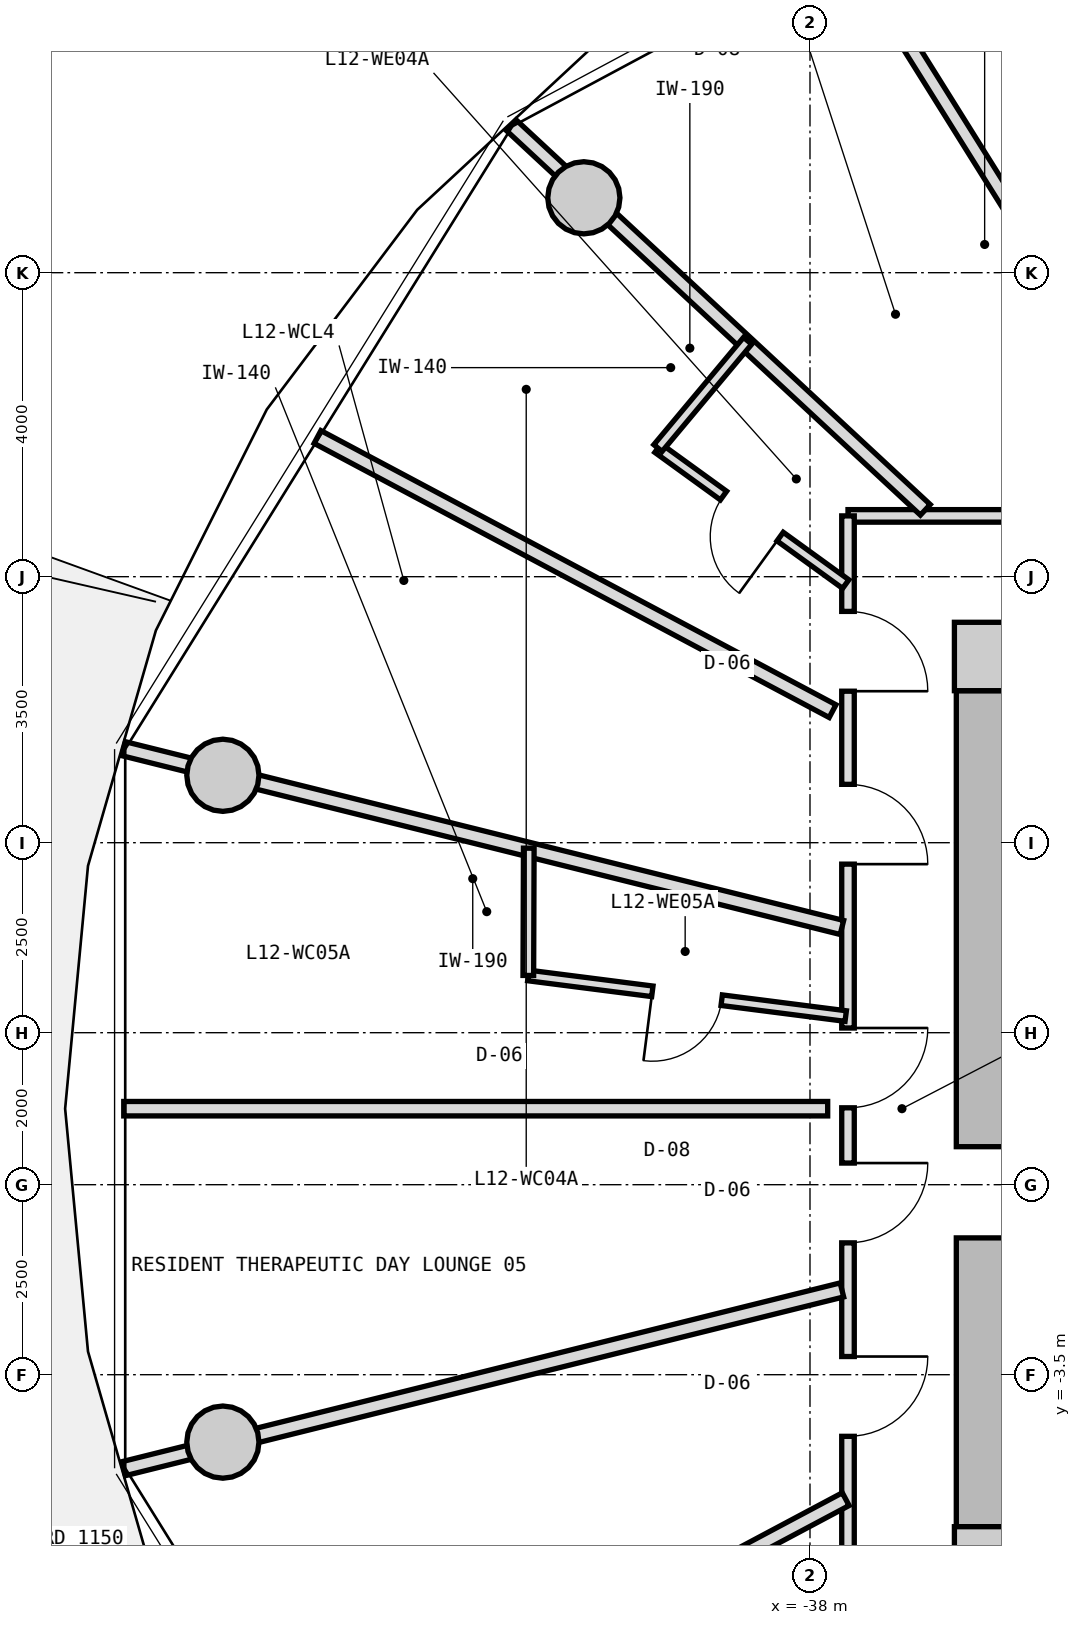
"""IFC4 building model, lengths in metres.
Left out: names, types, materials, properties, quantities, classifications, styles, units other than length and angle.
Written with IfcOpenShell. Run it as: python <this file> out.ifc"""

import sys

from ifc_helpers import new_model, si_unit, direction, frame, frame_2d, origin, origin_2d, place, context, subcontext, project, spatial, rectangle, circle, extrude, source, transform, mapped, element, fill, save


model = new_model("IFC4")
c1 = context("Model", 3, precision=1e-05, world=origin(), true_north=direction((0.0, 1.0)))
c2 = subcontext(c1, "Body", "Model", "MODEL_VIEW")
j1 = project(units=[si_unit("LENGTHUNIT", "METRE"), si_unit("PLANEANGLEUNIT", "RADIAN")], contexts=[c1])
p1 = place(None, origin())
s1 = spatial("IfcSite", under=j1, at=p1, CompositionType="ELEMENT")
p2 = place(p1, origin())
s2 = spatial("IfcBuilding", under=s1, at=p2, CompositionType="ELEMENT")
p3 = place(p2, frame((0.0, 0.0, 42.95)))
s3 = spatial("IfcBuildingStorey", under=s2, at=p3, CompositionType="ELEMENT", Elevation=42.95)
m1 = source(origin(), c2, "Body", "SweptSolid", [
    extrude(rectangle(XDim=0.9, YDim=0.9, at=origin_2d()), origin(), (0.0, 0.0, 1.0), 3.05),
])
for number, where, z_axis, x_axis in (
    (1, (-35.65, -5.95, 0.0), (0.0, 0.0, 1.0), (1.0, 0.0, 0.0)),
    (2, (-35.65, 5.95, 0.0), (0.0, 0.0, 1.0), (1.0, 0.0, 0.0)),
):
    element("IfcColumn", number, at=place(p3, frame(where, z_axis=z_axis, x_axis=x_axis)), inside=s3, PredefinedType="COLUMN", context=c2, shape_type="MappedRepresentation", body=[
        mapped(m1, transform((0.0, 0.0, 0.0), x_axis=(1.0, 0.0, 0.0), y_axis=(0.0, 1.0, 0.0), z_axis=(0.0, 0.0, 1.0), scale=1.0)),
    ])
m2 = source(origin(), c2, "Body", "SweptSolid", [
    extrude(rectangle(XDim=11.0, YDim=0.85, at=frame_2d((5.5, 0.0))), origin(), (0.0, 0.0, 1.0), 2.79),
])
p4 = place(p3, frame((-35.65, -5.5, 0.0), z_axis=(0.0, 0.0, 1.0), x_axis=(0.0, 1.0, 0.0)))
e3 = element("IfcWall", 3, at=p4, inside=s3, PredefinedType="SHEAR", context=c2, shape_type="MappedRepresentation", body=[
    mapped(m2, transform((0.0, 0.0, 0.0), x_axis=(1.0, 0.0, 0.0), y_axis=(0.0, 1.0, 0.0), z_axis=(0.0, 0.0, 1.0), scale=1.0)),
])
p5 = place(p4, frame((3.8, 0.0, 0.0)))
e4 = element("IfcOpeningElement", 4, at=p5, cuts=e3, PredefinedType="OPENING", context=c2, shape_type="SweptSolid", body=[
    extrude(rectangle(XDim=1.2, YDim=2.15, at=frame_2d((0.6, 1.075))), frame((0.0, 0.435, 0.0), z_axis=(0.0, -1.0, 0.0), x_axis=(1.0, 0.0, 0.0)), (0.0, 0.0, 1.0), 0.87),
])
m3 = source(origin(), c2, "Body", "SweptSolid", [
    extrude(circle(Radius=0.475, at=origin_2d()), origin(), (0.0, 0.0, 1.0), 3.05),
])
for number, where, z_axis, x_axis in (
    (5, (-40.975, 11.985, 0.0), (0.0, 0.0, 1.0), (1.0, 0.0, 0.0)),
    (6, (-45.725, 4.387, 0.0), (0.0, 0.0, 1.0), (1.0, 0.0, 0.0)),
    (7, (-45.725, -4.387, 0.0), (0.0, 0.0, 1.0), (1.0, 0.0, 0.0)),
):
    element("IfcColumn", number, at=place(p3, frame(where, z_axis=z_axis, x_axis=x_axis)), inside=s3, PredefinedType="COLUMN", context=c2, shape_type="MappedRepresentation", body=[
        mapped(m3, transform((0.0, 0.0, 0.0), x_axis=(1.0, 0.0, 0.0), y_axis=(0.0, 1.0, 0.0), z_axis=(0.0, 0.0, 1.0), scale=1.0)),
    ])
m4 = source(origin(), c2, "Body", "SweptSolid", [
    extrude(rectangle(XDim=19.0, YDim=0.165, at=frame_2d((9.5, 0.0))), origin(), (0.0, 0.0, 1.0), 2.775),
])
p6 = place(p3, frame((-37.5, 7.8, 0.0), z_axis=(0.0, 0.0, 1.0), x_axis=(1.0, 0.0, 0.0)))
e8 = element("IfcWall", 8, at=p6, inside=s3, PredefinedType="PARTITIONING", context=c2, shape_type="MappedRepresentation", body=[
    mapped(m4, transform((0.0, 0.0, 0.0), x_axis=(1.0, 0.0, 0.0), y_axis=(0.0, 1.0, 0.0), z_axis=(0.0, 0.0, 1.0), scale=1.0)),
])
p7 = place(p6, frame((4.773, 0.0, 0.0)))
e9 = element("IfcOpeningElement", 9, at=p7, cuts=e8, PredefinedType="OPENING", context=c2, shape_type="SweptSolid", body=[
    extrude(rectangle(XDim=1.05, YDim=2.15, at=frame_2d((0.525, 1.075))), frame((0.0, 0.093, 0.0), z_axis=(0.0, -1.0, 0.0), x_axis=(1.0, 0.0, 0.0)), (0.0, 0.0, 1.0), 0.185),
])
p8 = place(p6, frame((2.251, 0.0, 0.0)))
e10 = element("IfcOpeningElement", 10, at=p8, cuts=e8, PredefinedType="OPENING", context=c2, shape_type="SweptSolid", body=[
    extrude(rectangle(XDim=1.05, YDim=2.15, at=frame_2d((0.525, 1.075))), frame((0.0, 0.093, 0.0), z_axis=(0.0, -1.0, 0.0), x_axis=(1.0, 0.0, 0.0)), (0.0, 0.0, 1.0), 0.185),
])
p9 = place(p6, frame((14.653, 0.0, 0.0)))
e11 = element("IfcOpeningElement", 11, at=p9, cuts=e8, PredefinedType="OPENING", context=c2, shape_type="SweptSolid", body=[
    extrude(rectangle(XDim=1.05, YDim=2.15, at=frame_2d((0.525, 1.075))), frame((0.0, 0.093, 0.0), z_axis=(0.0, -1.0, 0.0), x_axis=(1.0, 0.0, 0.0)), (0.0, 0.0, 1.0), 0.185),
])
p10 = place(p6, frame((12.5, 0.0, 0.0)))
e12 = element("IfcOpeningElement", 12, at=p10, cuts=e8, PredefinedType="OPENING", context=c2, shape_type="SweptSolid", body=[
    extrude(rectangle(XDim=1.05, YDim=2.15, at=frame_2d((0.525, 1.075))), frame((0.0, 0.093, 0.0), z_axis=(0.0, -1.0, 0.0), x_axis=(1.0, 0.0, 0.0)), (0.0, 0.0, 1.0), 0.185),
])
p11 = place(p6, frame((9.352, 0.0, 0.0)))
e13 = element("IfcOpeningElement", 13, at=p11, cuts=e8, PredefinedType="OPENING", context=c2, shape_type="SweptSolid", body=[
    extrude(rectangle(XDim=1.05, YDim=2.15, at=frame_2d((0.525, 1.075))), frame((0.0, 0.093, 0.0), z_axis=(0.0, -1.0, 0.0), x_axis=(1.0, 0.0, 0.0)), (0.0, 0.0, 1.0), 0.185),
])
p12 = place(p6, frame((7.806, 0.0, 0.0)))
e14 = element("IfcOpeningElement", 14, at=p12, cuts=e8, PredefinedType="OPENING", context=c2, shape_type="SweptSolid", body=[
    extrude(rectangle(XDim=1.05, YDim=2.15, at=frame_2d((0.525, 1.075))), frame((0.0, 0.093, 0.0), z_axis=(0.0, -1.0, 0.0), x_axis=(1.0, 0.0, 0.0)), (0.0, 0.0, 1.0), 0.185),
])
m5 = source(origin(), c2, "Body", "SweptSolid", [
    extrude(rectangle(XDim=15.6, YDim=0.165, at=frame_2d((7.8, 0.0))), origin(), (0.0, 0.0, 1.0), 2.775),
])
p13 = place(p3, frame((-37.5, -7.8, 0.0), z_axis=(0.0, 0.0, 1.0), x_axis=(0.0, 1.0, 0.0)))
e15 = element("IfcWall", 15, at=p13, inside=s3, PredefinedType="PARTITIONING", context=c2, shape_type="MappedRepresentation", body=[
    mapped(m5, transform((0.0, 0.0, 0.0), x_axis=(1.0, 0.0, 0.0), y_axis=(0.0, 1.0, 0.0), z_axis=(0.0, 0.0, 1.0), scale=1.0)),
])
p14 = place(p13, frame((13.293, 0.0, 0.0)))
e16 = element("IfcOpeningElement", 16, at=p14, cuts=e15, PredefinedType="OPENING", context=c2, shape_type="SweptSolid", body=[
    extrude(rectangle(XDim=1.05, YDim=2.15, at=frame_2d((0.525, 1.075))), frame((0.0, 0.093, 0.0), z_axis=(0.0, -1.0, 0.0), x_axis=(1.0, 0.0, 0.0)), (0.0, 0.0, 1.0), 0.185),
])
p15 = place(p13, frame((11.018, 0.0, 0.0)))
e17 = element("IfcOpeningElement", 17, at=p15, cuts=e15, PredefinedType="OPENING", context=c2, shape_type="SweptSolid", body=[
    extrude(rectangle(XDim=1.05, YDim=2.15, at=frame_2d((0.525, 1.075))), frame((0.0, 0.093, 0.0), z_axis=(0.0, -1.0, 0.0), x_axis=(1.0, 0.0, 0.0)), (0.0, 0.0, 1.0), 0.185),
])
p16 = place(p13, frame((7.812, 0.0, 0.0)))
e18 = element("IfcOpeningElement", 18, at=p16, cuts=e15, PredefinedType="OPENING", context=c2, shape_type="SweptSolid", body=[
    extrude(rectangle(XDim=1.05, YDim=2.15, at=frame_2d((0.525, 1.075))), frame((0.0, 0.093, 0.0), z_axis=(0.0, -1.0, 0.0), x_axis=(1.0, 0.0, 0.0)), (0.0, 0.0, 1.0), 0.185),
])
p17 = place(p13, frame((6.035, 0.0, 0.0)))
e19 = element("IfcOpeningElement", 19, at=p17, cuts=e15, PredefinedType="OPENING", context=c2, shape_type="SweptSolid", body=[
    extrude(rectangle(XDim=1.05, YDim=2.15, at=frame_2d((0.525, 1.075))), frame((0.0, 0.093, 0.0), z_axis=(0.0, -1.0, 0.0), x_axis=(1.0, 0.0, 0.0)), (0.0, 0.0, 1.0), 0.185),
])
p18 = place(p13, frame((3.489, 0.0, 0.0)))
e20 = element("IfcOpeningElement", 20, at=p18, cuts=e15, PredefinedType="OPENING", context=c2, shape_type="SweptSolid", body=[
    extrude(rectangle(XDim=1.05, YDim=2.15, at=frame_2d((0.525, 1.075))), frame((0.0, 0.093, 0.0), z_axis=(0.0, -1.0, 0.0), x_axis=(1.0, 0.0, 0.0)), (0.0, 0.0, 1.0), 0.185),
])
p19 = place(p13, frame((0.882, 0.0, 0.0)))
e21 = element("IfcOpeningElement", 21, at=p19, cuts=e15, PredefinedType="OPENING", context=c2, shape_type="SweptSolid", body=[
    extrude(rectangle(XDim=1.05, YDim=2.15, at=frame_2d((0.525, 1.075))), frame((0.0, 0.093, 0.0), z_axis=(0.0, -1.0, 0.0), x_axis=(1.0, 0.0, 0.0)), (0.0, 0.0, 1.0), 0.185),
])
m6 = source(origin(), c2, "Body", "SweptSolid", [
    extrude(rectangle(XDim=7.435, YDim=0.19, at=frame_2d((3.717, 0.0))), origin(), (0.0, 0.0, 1.0), 2.225),
])
p20 = place(p3, frame((-36.483, 7.88, 0.0), z_axis=(0.0, 0.0, 1.0), x_axis=(-0.732651956848, 0.680603489652, 0.0)))
e22 = element("IfcWall", 22, at=p20, inside=s3, PredefinedType="PARTITIONING", context=c2, shape_type="MappedRepresentation", body=[
    mapped(m6, transform((0.0, 0.0, 0.0), x_axis=(1.0, 0.0, 0.0), y_axis=(0.0, 1.0, 0.0), z_axis=(0.0, 0.0, 1.0), scale=1.0)),
])
m7 = source(origin(), c2, "Body", "SweptSolid", [
    extrude(rectangle(XDim=8.598, YDim=0.19, at=frame_2d((4.299, 0.0))), origin(), (0.0, 0.0, 1.0), 2.775),
])
p21 = place(p3, frame((-32.957, 8.017, 0.0), z_axis=(0.0, 0.0, 1.0), x_axis=(-0.530039776395, 0.847972779893, 0.0)))
e23 = element("IfcWall", 23, at=p21, inside=s3, PredefinedType="PARTITIONING", context=c2, shape_type="MappedRepresentation", body=[
    mapped(m7, transform((0.0, 0.0, 0.0), x_axis=(1.0, 0.0, 0.0), y_axis=(0.0, 1.0, 0.0), z_axis=(0.0, 0.0, 1.0), scale=1.0)),
])
m8 = source(origin(), c2, "Body", "SweptSolid", [
    extrude(rectangle(XDim=9.737, YDim=0.19, at=frame_2d((4.869, 0.0))), origin(), (0.0, 0.0, 1.0), 2.225),
])
p22 = place(p3, frame((-37.58, 2.385, 0.0), z_axis=(0.0, 0.0, 1.0), x_axis=(-0.970392716238, 0.241532557375, 0.0)))
e24 = element("IfcWall", 24, at=p22, inside=s3, PredefinedType="PARTITIONING", context=c2, shape_type="MappedRepresentation", body=[
    mapped(m8, transform((0.0, 0.0, 0.0), x_axis=(1.0, 0.0, 0.0), y_axis=(0.0, 1.0, 0.0), z_axis=(0.0, 0.0, 1.0), scale=1.0)),
])
m9 = source(origin(), c2, "Body", "SweptSolid", [
    extrude(rectangle(XDim=7.677, YDim=0.19, at=frame_2d((3.838, 0.0))), origin(), (0.0, 0.0, 1.0), 2.775),
])
p23 = place(p3, frame((-37.703, 5.231, 0.0), z_axis=(0.0, 0.0, 1.0), x_axis=(-0.882725057546, 0.469889851753, 0.0)))
e25 = element("IfcWall", 25, at=p23, inside=s3, PredefinedType="PARTITIONING", context=c2, shape_type="MappedRepresentation", body=[
    mapped(m9, transform((0.0, 0.0, 0.0), x_axis=(1.0, 0.0, 0.0), y_axis=(0.0, 1.0, 0.0), z_axis=(0.0, 0.0, 1.0), scale=1.0)),
])
m10 = source(origin(), c2, "Body", "SweptSolid", [
    extrude(rectangle(XDim=3.051, YDim=0.14, at=frame_2d((1.525, 0.0))), origin(), (0.0, 0.0, 1.0), 2.775),
])
p24 = place(p3, frame((-37.53, 6.903, 0.0), z_axis=(0.0, 0.0, 1.0), x_axis=(-0.809849031404, 0.586638343729, 0.0)))
e26 = element("IfcWall", 26, at=p24, inside=s3, PredefinedType="PARTITIONING", context=c2, shape_type="MappedRepresentation", body=[
    mapped(m10, transform((0.0, 0.0, 0.0), x_axis=(1.0, 0.0, 0.0), y_axis=(0.0, 1.0, 0.0), z_axis=(0.0, 0.0, 1.0), scale=1.0)),
])
p25 = place(p24, frame((1.065, 0.0, 0.0)))
e27 = element("IfcOpeningElement", 27, at=p25, cuts=e26, PredefinedType="OPENING", context=c2, shape_type="SweptSolid", body=[
    extrude(rectangle(XDim=0.92, YDim=2.1, at=frame_2d((0.46, 1.05))), frame((0.0, 0.08, 0.0), z_axis=(0.0, -1.0, 0.0), x_axis=(1.0, 0.0, 0.0)), (0.0, 0.0, 1.0), 0.16),
])
m11 = source(origin(), c2, "Body", "SweptSolid", [
    extrude(rectangle(XDim=1.84, YDim=0.14, at=frame_2d((0.92, 0.0))), origin(), (0.0, 0.0, 1.0), 2.415),
])
p26 = place(p3, frame((-40.0, 8.692, 0.0), z_axis=(0.0, 0.0, 1.0), x_axis=(0.641410397049, 0.767197955262, 0.0)))
e28 = element("IfcWall", 28, at=p26, inside=s3, PredefinedType="PARTITIONING", context=c2, shape_type="MappedRepresentation", body=[
    mapped(m11, transform((0.0, 0.0, 0.0), x_axis=(1.0, 0.0, 0.0), y_axis=(0.0, 1.0, 0.0), z_axis=(0.0, 0.0, 1.0), scale=1.0)),
])
p27 = place(p3, frame((-37.58, -2.385, 0.0), z_axis=(0.0, 0.0, 1.0), x_axis=(-0.970392716238, -0.241532557375, 0.0)))
e29 = element("IfcWall", 29, at=p27, inside=s3, PredefinedType="PARTITIONING", context=c2, shape_type="MappedRepresentation", body=[
    mapped(m8, transform((0.0, 0.0, 0.0), x_axis=(1.0, 0.0, 0.0), y_axis=(0.0, 1.0, 0.0), z_axis=(0.0, 0.0, 1.0), scale=1.0)),
])
m12 = source(origin(), c2, "Body", "SweptSolid", [
    extrude(rectangle(XDim=9.261, YDim=0.19, at=frame_2d((4.631, 0.0))), origin(), (0.0, 0.0, 1.0), 2.775),
])
p28 = place(p3, frame((-37.767, 0.0, 0.0), z_axis=(0.0, 0.0, 1.0), x_axis=(-1.0, 0.0, 0.0)))
e30 = element("IfcWall", 30, at=p28, inside=s3, PredefinedType="PARTITIONING", context=c2, shape_type="MappedRepresentation", body=[
    mapped(m12, transform((0.0, 0.0, 0.0), x_axis=(1.0, 0.0, 0.0), y_axis=(0.0, 1.0, 0.0), z_axis=(0.0, 0.0, 1.0), scale=1.0)),
])
m13 = source(origin(), c2, "Body", "SweptSolid", [
    extrude(rectangle(XDim=4.21, YDim=0.14, at=frame_2d((2.105, 0.0))), origin(), (0.0, 0.0, 1.0), 2.775),
])
p29 = place(p3, frame((-37.53, 1.219, 0.0), z_axis=(0.0, 0.0, 1.0), x_axis=(-0.991917821325, 0.126881975625, 0.0)))
e31 = element("IfcWall", 31, at=p29, inside=s3, PredefinedType="PARTITIONING", context=c2, shape_type="MappedRepresentation", body=[
    mapped(m13, transform((0.0, 0.0, 0.0), x_axis=(1.0, 0.0, 0.0), y_axis=(0.0, 1.0, 0.0), z_axis=(0.0, 0.0, 1.0), scale=1.0)),
])
p30 = place(p29, frame((1.645, 0.0, 0.0)))
e32 = element("IfcOpeningElement", 32, at=p30, cuts=e31, PredefinedType="OPENING", context=c2, shape_type="SweptSolid", body=[
    extrude(rectangle(XDim=0.92, YDim=2.1, at=frame_2d((0.46, 1.05))), frame((0.0, 0.08, 0.0), z_axis=(0.0, -1.0, 0.0), x_axis=(1.0, 0.0, 0.0)), (0.0, 0.0, 1.0), 0.16),
])
m14 = source(origin(), c2, "Body", "SweptSolid", [
    extrude(rectangle(XDim=1.675, YDim=0.14, at=frame_2d((0.837, 0.0))), origin(), (0.0, 0.0, 1.0), 2.775),
])
p31 = place(p3, frame((-41.706, 1.753, 0.0), z_axis=(0.0, 0.0, 1.0), x_axis=(0.003644821977, 0.999993357614, 0.0)))
e33 = element("IfcWall", 33, at=p31, inside=s3, PredefinedType="PARTITIONING", context=c2, shape_type="MappedRepresentation", body=[
    mapped(m14, transform((0.0, 0.0, 0.0), x_axis=(1.0, 0.0, 0.0), y_axis=(0.0, 1.0, 0.0), z_axis=(0.0, 0.0, 1.0), scale=1.0)),
])
m15 = source(origin(), c2, "Body", "SweptSolid", [
    extrude(rectangle(XDim=7.873, YDim=0.19, at=frame_2d((3.937, 0.0))), origin(), (0.0, 0.0, 1.0), 2.775),
])
p32 = place(p3, frame((-37.53, -5.138, 0.0), z_axis=(0.0, 0.0, 1.0), x_axis=(-0.882666052726, -0.470000680175, 0.0)))
e34 = element("IfcWall", 34, at=p32, inside=s3, PredefinedType="PARTITIONING", context=c2, shape_type="MappedRepresentation", body=[
    mapped(m15, transform((0.0, 0.0, 0.0), x_axis=(1.0, 0.0, 0.0), y_axis=(0.0, 1.0, 0.0), z_axis=(0.0, 0.0, 1.0), scale=1.0)),
])
m16 = source(origin(), c2, "Body", "SweptSolid", [
    extrude(rectangle(XDim=1.2, YDim=2.15, at=frame_2d((0.6, 1.075))), frame((0.0, 0.025, 0.0), z_axis=(0.0, -1.0, 0.0), x_axis=(1.0, 0.0, 0.0)), (0.0, 0.0, 1.0), 0.05),
])
p33 = place(p5, frame((1.2, 0.0, 0.0), z_axis=(0.0, 0.0, 1.0), x_axis=(-1.0, 0.0, 0.0)))
e35 = element("IfcDoor", 35, at=p33, inside=s3, OperationType="SINGLE_SWING_LEFT", PredefinedType="DOOR", context=c2, shape_type="MappedRepresentation", body=[
    mapped(m16, transform((0.0, 0.0, 0.0), x_axis=(1.0, 0.0, 0.0), y_axis=(0.0, 1.0, 0.0), z_axis=(0.0, 0.0, 1.0), scale=1.0)),
])
fill(e4, e35)
m17 = source(origin(), c2, "Body", "SweptSolid", [
    extrude(rectangle(XDim=1.05, YDim=2.15, at=frame_2d((0.525, 1.075))), frame((0.0, 0.025, 0.0), z_axis=(0.0, -1.0, 0.0), x_axis=(1.0, 0.0, 0.0)), (0.0, 0.0, 1.0), 0.05),
])
p34 = place(p14, frame((1.05, 0.0, 0.0), z_axis=(0.0, 0.0, 1.0), x_axis=(-1.0, 0.0, 0.0)))
e36 = element("IfcDoor", 36, at=p34, inside=s3, OperationType="SINGLE_SWING_RIGHT", PredefinedType="DOOR", context=c2, shape_type="MappedRepresentation", body=[
    mapped(m17, transform((0.0, 0.0, 0.0), x_axis=(1.0, 0.0, 0.0), y_axis=(0.0, 1.0, 0.0), z_axis=(0.0, 0.0, 1.0), scale=1.0)),
])
fill(e16, e36)
m18 = source(origin(), c2, "Body", "SweptSolid", [
    extrude(rectangle(XDim=0.92, YDim=2.1, at=frame_2d((0.46, 1.05))), frame((0.0, 0.025, 0.0), z_axis=(0.0, -1.0, 0.0), x_axis=(1.0, 0.0, 0.0)), (0.0, 0.0, 1.0), 0.05),
])
p35 = place(p25, origin())
e37 = element("IfcDoor", 37, at=p35, inside=s3, OperationType="SINGLE_SWING_LEFT", PredefinedType="DOOR", context=c2, shape_type="MappedRepresentation", body=[
    mapped(m18, transform((0.0, 0.0, 0.0), x_axis=(1.0, 0.0, 0.0), y_axis=(0.0, 1.0, 0.0), z_axis=(0.0, 0.0, 1.0), scale=1.0)),
])
fill(e27, e37)
p36 = place(p15, frame((1.05, 0.0, 0.0), z_axis=(0.0, 0.0, 1.0), x_axis=(-1.0, 0.0, 0.0)))
e38 = element("IfcDoor", 38, at=p36, inside=s3, OperationType="SINGLE_SWING_RIGHT", PredefinedType="DOOR", context=c2, shape_type="MappedRepresentation", body=[
    mapped(m17, transform((0.0, 0.0, 0.0), x_axis=(1.0, 0.0, 0.0), y_axis=(0.0, 1.0, 0.0), z_axis=(0.0, 0.0, 1.0), scale=1.0)),
])
fill(e17, e38)
p37 = place(p16, frame((1.05, 0.0, 0.0), z_axis=(0.0, 0.0, 1.0), x_axis=(-1.0, 0.0, 0.0)))
e39 = element("IfcDoor", 39, at=p37, inside=s3, OperationType="SINGLE_SWING_LEFT", PredefinedType="DOOR", context=c2, shape_type="MappedRepresentation", body=[
    mapped(m17, transform((0.0, 0.0, 0.0), x_axis=(1.0, 0.0, 0.0), y_axis=(0.0, 1.0, 0.0), z_axis=(0.0, 0.0, 1.0), scale=1.0)),
])
fill(e18, e39)
p38 = place(p30, origin())
e40 = element("IfcDoor", 40, at=p38, inside=s3, OperationType="SINGLE_SWING_RIGHT", PredefinedType="DOOR", context=c2, shape_type="MappedRepresentation", body=[
    mapped(m18, transform((0.0, 0.0, 0.0), x_axis=(1.0, 0.0, 0.0), y_axis=(0.0, 1.0, 0.0), z_axis=(0.0, 0.0, 1.0), scale=1.0)),
])
fill(e32, e40)
p39 = place(p17, frame((1.05, 0.0, 0.0), z_axis=(0.0, 0.0, 1.0), x_axis=(-1.0, 0.0, 0.0)))
e41 = element("IfcDoor", 41, at=p39, inside=s3, OperationType="SINGLE_SWING_LEFT", PredefinedType="DOOR", context=c2, shape_type="MappedRepresentation", body=[
    mapped(m17, transform((0.0, 0.0, 0.0), x_axis=(1.0, 0.0, 0.0), y_axis=(0.0, 1.0, 0.0), z_axis=(0.0, 0.0, 1.0), scale=1.0)),
])
fill(e19, e41)
p40 = place(p18, frame((1.05, 0.0, 0.0), z_axis=(0.0, 0.0, 1.0), x_axis=(-1.0, 0.0, 0.0)))
e42 = element("IfcDoor", 42, at=p40, inside=s3, OperationType="SINGLE_SWING_LEFT", PredefinedType="DOOR", context=c2, shape_type="MappedRepresentation", body=[
    mapped(m17, transform((0.0, 0.0, 0.0), x_axis=(1.0, 0.0, 0.0), y_axis=(0.0, 1.0, 0.0), z_axis=(0.0, 0.0, 1.0), scale=1.0)),
])
fill(e20, e42)
save(model, sys.argv[1])
